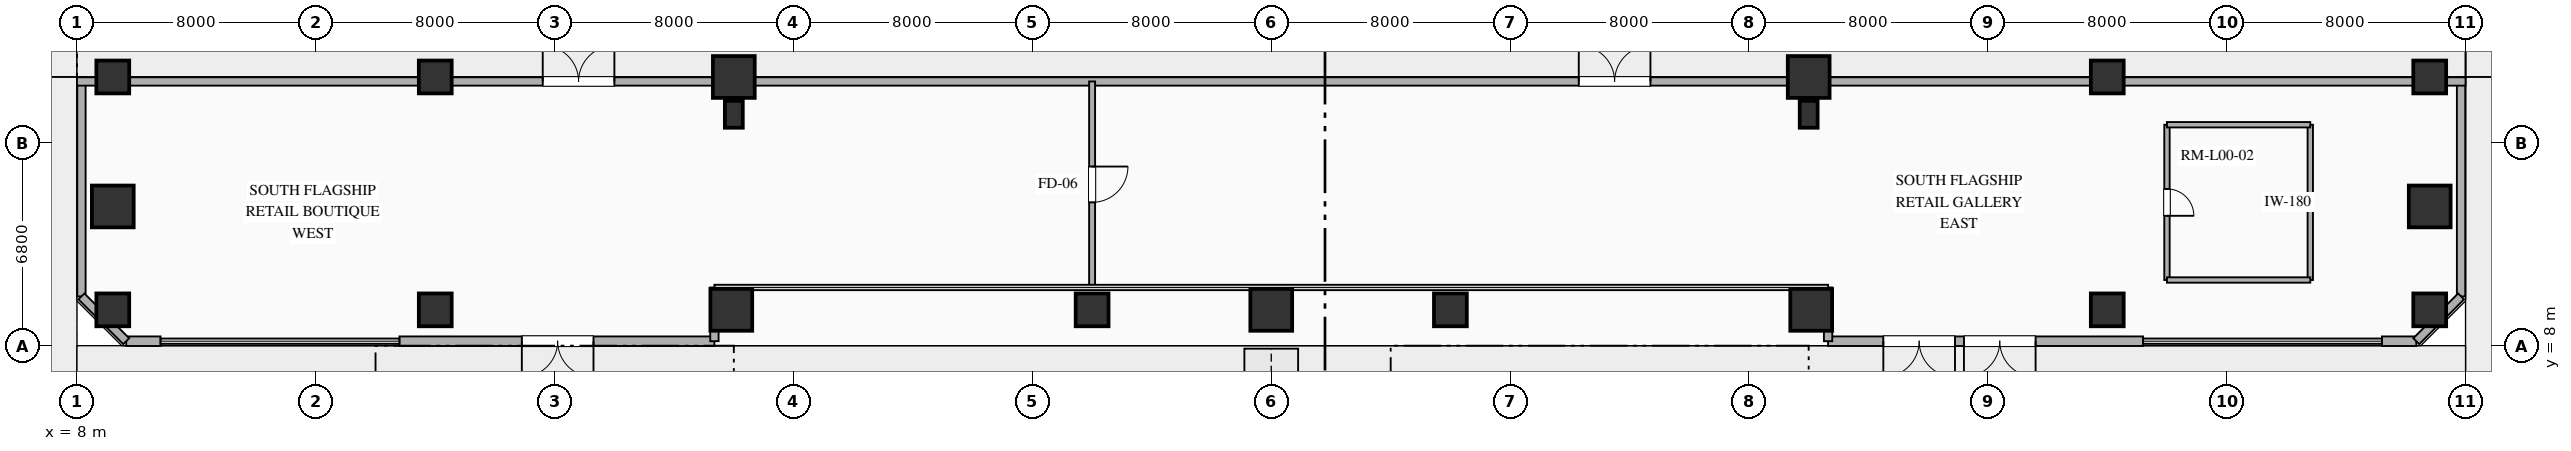
"""IFC4 building model, lengths in metres.
Left out: names, types, materials, properties, quantities, classifications, styles, units other than length and angle.
Written with IfcOpenShell. Run it as: python <this file> out.ifc"""

import sys

from ifc_helpers import new_model, si_unit, direction, frame, frame_2d, origin, origin_2d, place, context, subcontext, project, spatial, rectangle, extrude, element, fill, save


model = new_model("IFC4")
c1 = context("Model", 3, precision=1e-05, world=origin(), true_north=direction((0.0, 1.0)))
c2 = subcontext(c1, "Body", "Model", "MODEL_VIEW")
j1 = project(units=[si_unit("LENGTHUNIT", "METRE"), si_unit("PLANEANGLEUNIT", "RADIAN")], contexts=[c1])
p1 = place(None, origin())
s1 = spatial("IfcSite", under=j1, at=p1, CompositionType="ELEMENT")
p2 = place(p1, origin())
s2 = spatial("IfcBuilding", under=s1, at=p2, CompositionType="ELEMENT")
p3 = place(p2, origin())
s3 = spatial("IfcBuildingStorey", under=s2, at=p3, CompositionType="ELEMENT", Elevation=0.0)
for number, where, z_axis, x_axis in (
    (1, (9.2, 9.2, 0.0), (0.0, 0.0, 1.0), (1.0, 0.0, 0.0)),
    (2, (20.0, 9.2, 0.0), (0.0, 0.0, 1.0), (1.0, 0.0, 0.0)),
    (3, (42.0, 9.2, 0.0), (0.0, 0.0, 1.0), (1.0, 0.0, 0.0)),
    (4, (54.0, 9.2, 0.0), (0.0, 0.0, 1.0), (1.0, 0.0, 0.0)),
    (5, (76.0, 9.2, 0.0), (0.0, 0.0, 1.0), (1.0, 0.0, 0.0)),
    (6, (86.8, 9.2, 0.0), (0.0, 0.0, 1.0), (1.0, 0.0, 0.0)),
    (7, (9.2, 17.0, 0.0), (0.0, 0.0, 1.0), (1.0, 0.0, 0.0)),
    (8, (86.8, 17.0, 0.0), (0.0, 0.0, 1.0), (1.0, 0.0, 0.0)),
    (9, (20.0, 17.0, 0.0), (0.0, 0.0, 1.0), (1.0, 0.0, 0.0)),
):
    element("IfcColumn", number, at=place(p3, frame(where, z_axis=z_axis, x_axis=x_axis)), inside=s3, PredefinedType="COLUMN", context=c2, shape_type="SweptSolid", body=[
        extrude(rectangle(XDim=1.1, YDim=1.1, at=origin_2d()), origin(), (0.0, 0.0, 1.0), 5.72),
    ])
for number, where, z_axis, x_axis in (
    (10, (30.0, 17.0, 0.0), (0.0, 0.0, 1.0), (1.0, 0.0, 0.0)),
    (11, (66.0, 17.0, 0.0), (0.0, 0.0, 1.0), (1.0, 0.0, 0.0)),
):
    element("IfcColumn", number, at=place(p3, frame(where, z_axis=z_axis, x_axis=x_axis)), inside=s3, PredefinedType="COLUMN", context=c2, shape_type="SweptSolid", body=[
        extrude(rectangle(XDim=1.4, YDim=1.4, at=origin_2d()), origin(), (0.0, 0.0, 1.0), 5.72),
    ])
p4 = place(p3, frame((76.0, 17.0, 0.0), z_axis=(0.0, 0.0, 1.0), x_axis=(1.0, 0.0, 0.0)))
e12 = element("IfcColumn", 12, at=p4, inside=s3, PredefinedType="COLUMN", context=c2, shape_type="SweptSolid", body=[
    extrude(rectangle(XDim=1.1, YDim=1.1, at=origin_2d()), origin(), (0.0, 0.0, 1.0), 5.72),
])
for number, where, z_axis, x_axis in (
    (13, (9.2, 12.663, 0.0), (0.0, 0.0, 1.0), (1.0, 0.0, 0.0)),
    (14, (29.916, 9.2, 0.0), (0.0, 0.0, 1.0), (1.0, 0.0, 0.0)),
    (15, (48.0, 9.2, 0.0), (0.0, 0.0, 1.0), (1.0, 0.0, 0.0)),
    (16, (66.084, 9.2, 0.0), (0.0, 0.0, 1.0), (1.0, 0.0, 0.0)),
    (17, (86.8, 12.663, 0.0), (0.0, 0.0, 1.0), (1.0, 0.0, 0.0)),
):
    element("IfcColumn", number, at=place(p3, frame(where, z_axis=z_axis, x_axis=x_axis)), inside=s3, PredefinedType="COLUMN", context=c2, shape_type="SweptSolid", body=[
        extrude(rectangle(XDim=1.4, YDim=1.4, at=origin_2d()), origin(), (0.0, 0.0, 1.0), 5.72),
    ])
for number, where, z_axis, x_axis in (
    (18, (30.0, 15.75, 0.0), (0.0, 0.0, 1.0), (1.0, 0.0, 0.0)),
    (19, (66.0, 15.75, 0.0), (0.0, 0.0, 1.0), (1.0, 0.0, 0.0)),
):
    element("IfcColumn", number, at=place(p3, frame(where, z_axis=z_axis, x_axis=x_axis)), inside=s3, PredefinedType="PILASTER", context=c2, shape_type="SweptSolid", body=[
        extrude(rectangle(XDim=0.6, YDim=0.9, at=origin_2d()), origin(), (0.0, 0.0, 1.0), 5.72),
    ])
for number, where, z_axis, x_axis in (
    (20, (9.65, 8.15, 0.0), (0.0, 0.0, 1.0), (1.0, 0.0, 0.0)),
    (21, (85.2, 8.15, 0.0), (0.0, 0.0, 1.0), (1.0, 0.0, 0.0)),
):
    element("IfcWall", number, at=place(p3, frame(where, z_axis=z_axis, x_axis=x_axis)), inside=s3, PredefinedType="SOLIDWALL", context=c2, shape_type="SweptSolid", body=[
        extrude(rectangle(XDim=1.15, YDim=0.32, at=frame_2d((0.575, 0.0))), origin(), (0.0, 0.0, 1.0), 5.72),
    ])
p5 = place(p3, frame((29.35, 8.15, 0.0), z_axis=(0.0, 0.0, 1.0), x_axis=(-1.0, 0.0, 0.0)))
e22 = element("IfcWall", 22, at=p5, inside=s3, PredefinedType="SOLIDWALL", context=c2, shape_type="SweptSolid", body=[
    extrude(rectangle(XDim=10.55, YDim=0.32, at=frame_2d((5.275, 0.0))), origin(), (0.0, 0.0, 1.0), 5.72),
])
p6 = place(p5, frame((4.05, 0.0, 0.0)))
e23 = element("IfcOpeningElement", 23, at=p6, cuts=e22, PredefinedType="OPENING", context=c2, shape_type="SweptSolid", body=[
    extrude(rectangle(XDim=2.4, YDim=2.6, at=frame_2d((1.2, 1.3))), frame((0.0, 0.17, 0.0), z_axis=(0.0, -1.0, 0.0), x_axis=(1.0, 0.0, 0.0)), (0.0, 0.0, 1.0), 0.34),
])
p7 = place(p3, frame((77.2, 8.15, 0.0), z_axis=(0.0, 0.0, 1.0), x_axis=(-1.0, 0.0, 0.0)))
e24 = element("IfcWall", 24, at=p7, inside=s3, PredefinedType="SOLIDWALL", context=c2, shape_type="SweptSolid", body=[
    extrude(rectangle(XDim=10.55, YDim=0.32, at=frame_2d((5.275, 0.0))), origin(), (0.0, 0.0, 1.0), 5.72),
])
p8 = place(p7, frame((6.3, 0.0, 0.0)))
e25 = element("IfcOpeningElement", 25, at=p8, cuts=e24, PredefinedType="OPENING", context=c2, shape_type="SweptSolid", body=[
    extrude(rectangle(XDim=2.4, YDim=2.6, at=frame_2d((1.2, 1.3))), frame((0.0, 0.17, 0.0), z_axis=(0.0, -1.0, 0.0), x_axis=(1.0, 0.0, 0.0)), (0.0, 0.0, 1.0), 0.34),
])
p9 = place(p7, frame((3.6, 0.0, 0.0)))
e26 = element("IfcOpeningElement", 26, at=p9, cuts=e24, PredefinedType="OPENING", context=c2, shape_type="SweptSolid", body=[
    extrude(rectangle(XDim=2.4, YDim=2.6, at=frame_2d((1.2, 1.3))), frame((0.0, 0.17, 0.0), z_axis=(0.0, -1.0, 0.0), x_axis=(1.0, 0.0, 0.0)), (0.0, 0.0, 1.0), 0.34),
])
for number, where, z_axis, x_axis in (
    (27, (29.35, 8.15, 0.0), (0.0, 0.0, 1.0), (0.0, 1.0, 0.0)),
    (28, (66.65, 9.95, 0.0), (0.0, 0.0, 1.0), (0.0, -1.0, 0.0)),
):
    element("IfcWall", number, at=place(p3, frame(where, z_axis=z_axis, x_axis=x_axis)), inside=s3, PredefinedType="SOLIDWALL", context=c2, shape_type="SweptSolid", body=[
        extrude(rectangle(XDim=1.8, YDim=0.28, at=frame_2d((0.9, 0.0))), origin(), (0.0, 0.0, 1.0), 5.72),
    ])
for number, where, z_axis, x_axis in (
    (29, (8.15, 17.0, 0.0), (0.0, 0.0, 1.0), (0.0, -1.0, 0.0)),
    (30, (87.85, 9.65, 0.0), (0.0, 0.0, 1.0), (0.0, 1.0, 0.0)),
):
    element("IfcWall", number, at=place(p3, frame(where, z_axis=z_axis, x_axis=x_axis)), inside=s3, PredefinedType="SOLIDWALL", context=c2, shape_type="SweptSolid", body=[
        extrude(rectangle(XDim=7.35, YDim=0.28, at=frame_2d((3.675, 0.0))), origin(), (0.0, 0.0, 1.0), 5.72),
    ])
p10 = place(p3, frame((8.0, 16.85, 0.0), z_axis=(0.0, 0.0, 1.0), x_axis=(1.0, 0.0, 0.0)))
e31 = element("IfcWall", 31, at=p10, inside=s3, PredefinedType="SOLIDWALL", context=c2, shape_type="SweptSolid", body=[
    extrude(rectangle(XDim=80.0, YDim=0.28, at=frame_2d((40.0, 0.0))), origin(), (0.0, 0.0, 1.0), 5.72),
])
p11 = place(p10, frame((15.6, 0.0, 0.0)))
e32 = element("IfcOpeningElement", 32, at=p11, cuts=e31, PredefinedType="OPENING", context=c2, shape_type="SweptSolid", body=[
    extrude(rectangle(XDim=2.4, YDim=2.6, at=frame_2d((1.2, 1.3))), frame((0.0, 0.15, 0.0), z_axis=(0.0, -1.0, 0.0), x_axis=(1.0, 0.0, 0.0)), (0.0, 0.0, 1.0), 0.3),
])
p12 = place(p10, frame((50.3, 0.0, 0.0)))
e33 = element("IfcOpeningElement", 33, at=p12, cuts=e31, PredefinedType="OPENING", context=c2, shape_type="SweptSolid", body=[
    extrude(rectangle(XDim=2.4, YDim=2.6, at=frame_2d((1.2, 1.3))), frame((0.0, 0.15, 0.0), z_axis=(0.0, -1.0, 0.0), x_axis=(1.0, 0.0, 0.0)), (0.0, 0.0, 1.0), 0.3),
])
for number, where, z_axis, x_axis in (
    (34, (8.15, 9.65, 0.0), (0.0, 0.0, 1.0), (0.707, -0.707, 0.0)),
    (35, (86.35, 8.15, 0.0), (0.0, 0.0, 1.0), (0.707, 0.707, 0.0)),
):
    element("IfcWall", number, at=place(p3, frame(where, z_axis=z_axis, x_axis=x_axis)), inside=s3, PredefinedType="SOLIDWALL", context=c2, shape_type="SweptSolid", body=[
        extrude(rectangle(XDim=2.121, YDim=0.28, at=frame_2d((1.061, 0.0))), origin(), (0.0, 0.0, 1.0), 5.72),
    ])
p13 = place(p3, frame((42.0, 16.85, 0.0), z_axis=(0.0, 0.0, 1.0), x_axis=(0.0, -1.0, 0.0)))
e36 = element("IfcWall", 36, at=p13, inside=s3, PredefinedType="PARTITIONING", context=c2, shape_type="SweptSolid", body=[
    extrude(rectangle(XDim=6.9, YDim=0.2, at=frame_2d((3.45, 0.0))), origin(), (0.0, 0.0, 1.0), 4.92),
])
p14 = place(p13, frame((2.85, 0.0, 0.0)))
e37 = element("IfcOpeningElement", 37, at=p14, cuts=e36, PredefinedType="OPENING", context=c2, shape_type="SweptSolid", body=[
    extrude(rectangle(XDim=1.2, YDim=2.25, at=frame_2d((0.6, 1.125))), frame((0.0, 0.11, 0.0), z_axis=(0.0, -1.0, 0.0), x_axis=(1.0, 0.0, 0.0)), (0.0, 0.0, 1.0), 0.22),
])
p15 = place(p3, frame((78.0, 15.4, 0.0), z_axis=(0.0, 0.0, 1.0), x_axis=(0.0, -1.0, 0.0)))
e38 = element("IfcWall", 38, at=p15, inside=s3, PredefinedType="PLUMBINGWALL", context=c2, shape_type="SweptSolid", body=[
    extrude(rectangle(XDim=5.2, YDim=0.18, at=frame_2d((2.6, 0.0))), origin(), (0.0, 0.0, 1.0), 4.92),
])
p16 = place(p15, frame((2.15, 0.0, 0.0)))
e39 = element("IfcOpeningElement", 39, at=p16, cuts=e38, PredefinedType="OPENING", context=c2, shape_type="SweptSolid", body=[
    extrude(rectangle(XDim=0.9, YDim=2.1, at=frame_2d((0.45, 1.05))), frame((0.0, 0.1, 0.0), z_axis=(0.0, -1.0, 0.0), x_axis=(1.0, 0.0, 0.0)), (0.0, 0.0, 1.0), 0.2),
])
p17 = place(p3, frame((82.8, 10.2, 0.0), z_axis=(0.0, 0.0, 1.0), x_axis=(0.0, 1.0, 0.0)))
e40 = element("IfcWall", 40, at=p17, inside=s3, PredefinedType="PLUMBINGWALL", context=c2, shape_type="SweptSolid", body=[
    extrude(rectangle(XDim=5.2, YDim=0.18, at=frame_2d((2.6, 0.0))), origin(), (0.0, 0.0, 1.0), 4.92),
])
for number, where, z_axis, x_axis in (
    (41, (78.0, 10.2, 0.0), (0.0, 0.0, 1.0), (1.0, 0.0, 0.0)),
    (42, (82.8, 15.4, 0.0), (0.0, 0.0, 1.0), (-1.0, 0.0, 0.0)),
):
    element("IfcWall", number, at=place(p3, frame(where, z_axis=z_axis, x_axis=x_axis)), inside=s3, PredefinedType="PLUMBINGWALL", context=c2, shape_type="SweptSolid", body=[
        extrude(rectangle(XDim=4.8, YDim=0.18, at=frame_2d((2.4, 0.0))), origin(), (0.0, 0.0, 1.0), 4.92),
    ])
p18 = place(p6, origin())
e43 = element("IfcDoor", 43, at=p18, inside=s3, OperationType="DOUBLE_DOOR_SINGLE_SWING", PredefinedType="DOOR", context=c2, shape_type="SweptSolid", body=[
    extrude(rectangle(XDim=2.4, YDim=2.6, at=frame_2d((1.2, 1.3))), frame((0.0, 0.025, 0.0), z_axis=(0.0, -1.0, 0.0), x_axis=(1.0, 0.0, 0.0)), (0.0, 0.0, 1.0), 0.05),
])
fill(e23, e43)
p19 = place(p8, origin())
e44 = element("IfcDoor", 44, at=p19, inside=s3, OperationType="DOUBLE_DOOR_SINGLE_SWING", PredefinedType="DOOR", context=c2, shape_type="SweptSolid", body=[
    extrude(rectangle(XDim=2.4, YDim=2.6, at=frame_2d((1.2, 1.3))), frame((0.0, 0.025, 0.0), z_axis=(0.0, -1.0, 0.0), x_axis=(1.0, 0.0, 0.0)), (0.0, 0.0, 1.0), 0.05),
])
fill(e25, e44)
p20 = place(p9, origin())
e45 = element("IfcDoor", 45, at=p20, inside=s3, OperationType="DOUBLE_DOOR_SINGLE_SWING", PredefinedType="DOOR", context=c2, shape_type="SweptSolid", body=[
    extrude(rectangle(XDim=2.4, YDim=2.6, at=frame_2d((1.2, 1.3))), frame((0.0, 0.025, 0.0), z_axis=(0.0, -1.0, 0.0), x_axis=(1.0, 0.0, 0.0)), (0.0, 0.0, 1.0), 0.05),
])
fill(e26, e45)
p21 = place(p11, origin())
e46 = element("IfcDoor", 46, at=p21, inside=s3, OperationType="DOUBLE_DOOR_SINGLE_SWING", PredefinedType="DOOR", context=c2, shape_type="SweptSolid", body=[
    extrude(rectangle(XDim=2.4, YDim=2.6, at=frame_2d((1.2, 1.3))), frame((0.0, 0.025, 0.0), z_axis=(0.0, -1.0, 0.0), x_axis=(1.0, 0.0, 0.0)), (0.0, 0.0, 1.0), 0.05),
])
fill(e32, e46)
p22 = place(p12, origin())
e47 = element("IfcDoor", 47, at=p22, inside=s3, OperationType="DOUBLE_DOOR_SINGLE_SWING", PredefinedType="DOOR", context=c2, shape_type="SweptSolid", body=[
    extrude(rectangle(XDim=2.4, YDim=2.6, at=frame_2d((1.2, 1.3))), frame((0.0, 0.025, 0.0), z_axis=(0.0, -1.0, 0.0), x_axis=(1.0, 0.0, 0.0)), (0.0, 0.0, 1.0), 0.05),
])
fill(e33, e47)
p23 = place(p14, origin())
e48 = element("IfcDoor", 48, at=p23, inside=s3, OperationType="SINGLE_SWING_LEFT", PredefinedType="DOOR", context=c2, shape_type="SweptSolid", body=[
    extrude(rectangle(XDim=1.2, YDim=2.25, at=frame_2d((0.6, 1.125))), frame((0.0, 0.025, 0.0), z_axis=(0.0, -1.0, 0.0), x_axis=(1.0, 0.0, 0.0)), (0.0, 0.0, 1.0), 0.05),
])
fill(e37, e48)
p24 = place(p16, origin())
e49 = element("IfcDoor", 49, at=p24, inside=s3, OperationType="SINGLE_SWING_RIGHT", PredefinedType="DOOR", context=c2, shape_type="SweptSolid", body=[
    extrude(rectangle(XDim=0.9, YDim=2.1, at=frame_2d((0.45, 1.05))), frame((0.0, 0.025, 0.0), z_axis=(0.0, -1.0, 0.0), x_axis=(1.0, 0.0, 0.0)), (0.0, 0.0, 1.0), 0.05),
])
fill(e39, e49)
save(model, sys.argv[1])
